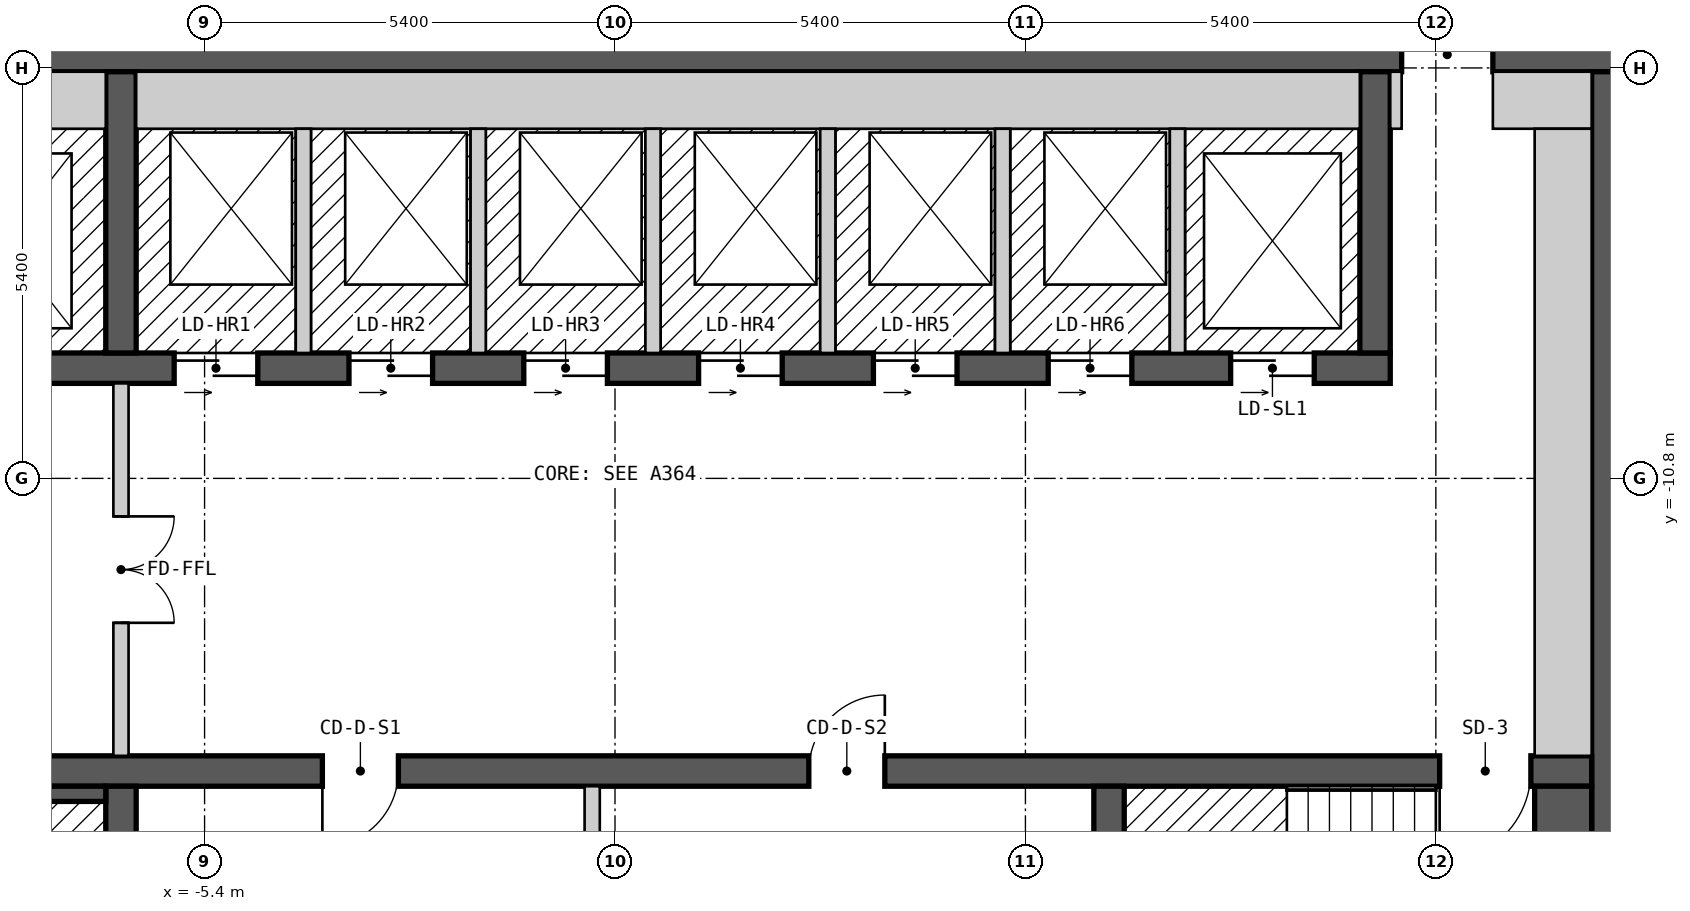
"""IFC4 building model, lengths in metres.
Left out: names, types, materials, properties, quantities, classifications, styles, units other than length and angle.
Written with IfcOpenShell. Run it as: python <this file> out.ifc"""

import sys

from ifc_helpers import new_model, si_unit, direction, frame, frame_2d, origin, place, context, subcontext, project, spatial, rectangle, extrude, element, fill, save


model = new_model("IFC4")
c1 = context("Model", 3, precision=1e-05, world=origin(), true_north=direction((0.0, 1.0)))
c2 = subcontext(c1, "Body", "Model", "MODEL_VIEW")
j1 = project(units=[si_unit("LENGTHUNIT", "METRE"), si_unit("PLANEANGLEUNIT", "RADIAN")], contexts=[c1])
p1 = place(None, origin())
s1 = spatial("IfcSite", under=j1, at=p1, CompositionType="ELEMENT")
p2 = place(p1, origin())
s2 = spatial("IfcBuilding", under=s1, at=p2, CompositionType="ELEMENT")
p3 = place(p2, frame((0.0, 0.0, 235.8)))
s3 = spatial("IfcBuildingStorey", under=s2, at=p3, CompositionType="ELEMENT", Elevation=235.8)
p4 = place(p3, frame((-13.3, -5.225, 0.0), z_axis=(0.0, 0.0, 1.0), x_axis=(1.0, 0.0, 0.0)))
e1 = element("IfcWall", 1, at=p4, inside=s3, PredefinedType="SHEAR", context=c2, shape_type="SweptSolid", body=[
    extrude(rectangle(XDim=26.6, YDim=0.45, at=frame_2d((13.3, 0.0))), origin(), (0.0, 0.0, 1.0), 2.7),
])
p5 = place(p4, frame((23.65, 0.0, 0.0)))
e2 = element("IfcOpeningElement", 2, at=p5, cuts=e1, PredefinedType="OPENING", context=c2, shape_type="SweptSolid", body=[
    extrude(rectangle(XDim=1.2, YDim=2.1, at=frame_2d((0.6, 1.05))), frame((0.0, 0.235, 0.0), z_axis=(0.0, -1.0, 0.0), x_axis=(1.0, 0.0, 0.0)), (0.0, 0.0, 1.0), 0.47),
])
p6 = place(p3, frame((13.075, -18.55, 0.0), z_axis=(0.0, 0.0, 1.0), x_axis=(0.0, 1.0, 0.0)))
e3 = element("IfcWall", 3, at=p6, inside=s3, PredefinedType="SHEAR", context=c2, shape_type="SweptSolid", body=[
    extrude(rectangle(XDim=13.1, YDim=0.45, at=frame_2d((6.55, 0.0))), origin(), (0.0, 0.0, 1.0), 2.7),
])
p7 = place(p3, frame((-12.85, -14.65, 0.0), z_axis=(0.0, 0.0, 1.0), x_axis=(1.0, 0.0, 0.0)))
e4 = element("IfcWall", 4, at=p7, inside=s3, PredefinedType="SHEAR", context=c2, shape_type="SweptSolid", body=[
    extrude(rectangle(XDim=25.7, YDim=0.4, at=frame_2d((12.85, 0.0))), origin(), (0.0, 0.0, 1.0), 2.7),
])
p8 = place(p7, frame((2.05, 0.0, 0.0), z_axis=(0.0, 0.0, 1.0), x_axis=(-1.0, 0.0, 0.0)))
e5 = element("IfcOpeningElement", 5, at=p8, cuts=e4, PredefinedType="OPENING", context=c2, shape_type="SweptSolid", body=[
    extrude(rectangle(XDim=1.2, YDim=2.1, at=frame_2d((0.6, 1.05))), frame((0.0, 0.21, 0.0), z_axis=(0.0, -1.0, 0.0), x_axis=(1.0, 0.0, 0.0)), (0.0, 0.0, 1.0), 0.42),
])
p9 = place(p7, frame((24.9, 0.0, 0.0), z_axis=(0.0, 0.0, 1.0), x_axis=(-1.0, 0.0, 0.0)))
e6 = element("IfcOpeningElement", 6, at=p9, cuts=e4, PredefinedType="OPENING", context=c2, shape_type="SweptSolid", body=[
    extrude(rectangle(XDim=1.2, YDim=2.1, at=frame_2d((0.6, 1.05))), frame((0.0, 0.21, 0.0), z_axis=(0.0, -1.0, 0.0), x_axis=(1.0, 0.0, 0.0)), (0.0, 0.0, 1.0), 0.42),
])
p10 = place(p7, frame((10.0, 0.0, 0.0), z_axis=(0.0, 0.0, 1.0), x_axis=(-1.0, 0.0, 0.0)))
e7 = element("IfcOpeningElement", 7, at=p10, cuts=e4, PredefinedType="OPENING", context=c2, shape_type="SweptSolid", body=[
    extrude(rectangle(XDim=1.0, YDim=2.1, at=frame_2d((0.5, 1.05))), frame((0.0, 0.21, 0.0), z_axis=(0.0, -1.0, 0.0), x_axis=(1.0, 0.0, 0.0)), (0.0, 0.0, 1.0), 0.42),
])
p11 = place(p7, frame((16.4, 0.0, 0.0), z_axis=(0.0, 0.0, 1.0), x_axis=(-1.0, 0.0, 0.0)))
e8 = element("IfcOpeningElement", 8, at=p11, cuts=e4, PredefinedType="OPENING", context=c2, shape_type="SweptSolid", body=[
    extrude(rectangle(XDim=1.0, YDim=2.1, at=frame_2d((0.5, 1.05))), frame((0.0, 0.21, 0.0), z_axis=(0.0, -1.0, 0.0), x_axis=(1.0, 0.0, 0.0)), (0.0, 0.0, 1.0), 0.42),
])
p12 = place(p3, frame((-12.85, -9.35, 0.0), z_axis=(0.0, 0.0, 1.0), x_axis=(1.0, 0.0, 0.0)))
e9 = element("IfcWall", 9, at=p12, inside=s3, PredefinedType="SHEAR", context=c2, shape_type="SweptSolid", body=[
    extrude(rectangle(XDim=23.05, YDim=0.4, at=frame_2d((11.525, 0.0))), origin(), (0.0, 0.0, 1.0), 2.7),
])
p13 = place(p12, frame((1.45, 0.0, 0.0)))
e10 = element("IfcOpeningElement", 10, at=p13, cuts=e9, PredefinedType="OPENING", context=c2, shape_type="SweptSolid", body=[
    extrude(rectangle(XDim=1.1, YDim=2.1, at=frame_2d((0.55, 1.05))), frame((0.0, 0.21, 0.0), z_axis=(0.0, -1.0, 0.0), x_axis=(1.0, 0.0, 0.0)), (0.0, 0.0, 1.0), 0.42),
])
p14 = place(p12, frame((4.25, 0.0, 0.0)))
e11 = element("IfcOpeningElement", 11, at=p14, cuts=e9, PredefinedType="OPENING", context=c2, shape_type="SweptSolid", body=[
    extrude(rectangle(XDim=1.1, YDim=2.1, at=frame_2d((0.55, 1.05))), frame((0.0, 0.21, 0.0), z_axis=(0.0, -1.0, 0.0), x_axis=(1.0, 0.0, 0.0)), (0.0, 0.0, 1.0), 0.42),
])
p15 = place(p12, frame((7.05, 0.0, 0.0)))
e12 = element("IfcOpeningElement", 12, at=p15, cuts=e9, PredefinedType="OPENING", context=c2, shape_type="SweptSolid", body=[
    extrude(rectangle(XDim=1.1, YDim=2.1, at=frame_2d((0.55, 1.05))), frame((0.0, 0.21, 0.0), z_axis=(0.0, -1.0, 0.0), x_axis=(1.0, 0.0, 0.0)), (0.0, 0.0, 1.0), 0.42),
])
p16 = place(p12, frame((9.35, 0.0, 0.0)))
e13 = element("IfcOpeningElement", 13, at=p16, cuts=e9, PredefinedType="OPENING", context=c2, shape_type="SweptSolid", body=[
    extrude(rectangle(XDim=1.1, YDim=2.1, at=frame_2d((0.55, 1.05))), frame((0.0, 0.21, 0.0), z_axis=(0.0, -1.0, 0.0), x_axis=(1.0, 0.0, 0.0)), (0.0, 0.0, 1.0), 0.42),
])
p17 = place(p12, frame((11.65, 0.0, 0.0)))
e14 = element("IfcOpeningElement", 14, at=p17, cuts=e9, PredefinedType="OPENING", context=c2, shape_type="SweptSolid", body=[
    extrude(rectangle(XDim=1.1, YDim=2.1, at=frame_2d((0.55, 1.05))), frame((0.0, 0.21, 0.0), z_axis=(0.0, -1.0, 0.0), x_axis=(1.0, 0.0, 0.0)), (0.0, 0.0, 1.0), 0.42),
])
p18 = place(p12, frame((13.95, 0.0, 0.0)))
e15 = element("IfcOpeningElement", 15, at=p18, cuts=e9, PredefinedType="OPENING", context=c2, shape_type="SweptSolid", body=[
    extrude(rectangle(XDim=1.1, YDim=2.1, at=frame_2d((0.55, 1.05))), frame((0.0, 0.21, 0.0), z_axis=(0.0, -1.0, 0.0), x_axis=(1.0, 0.0, 0.0)), (0.0, 0.0, 1.0), 0.42),
])
p19 = place(p12, frame((16.25, 0.0, 0.0)))
e16 = element("IfcOpeningElement", 16, at=p19, cuts=e9, PredefinedType="OPENING", context=c2, shape_type="SweptSolid", body=[
    extrude(rectangle(XDim=1.1, YDim=2.1, at=frame_2d((0.55, 1.05))), frame((0.0, 0.21, 0.0), z_axis=(0.0, -1.0, 0.0), x_axis=(1.0, 0.0, 0.0)), (0.0, 0.0, 1.0), 0.42),
])
p20 = place(p12, frame((18.55, 0.0, 0.0)))
e17 = element("IfcOpeningElement", 17, at=p20, cuts=e9, PredefinedType="OPENING", context=c2, shape_type="SweptSolid", body=[
    extrude(rectangle(XDim=1.1, YDim=2.1, at=frame_2d((0.55, 1.05))), frame((0.0, 0.21, 0.0), z_axis=(0.0, -1.0, 0.0), x_axis=(1.0, 0.0, 0.0)), (0.0, 0.0, 1.0), 0.42),
])
p21 = place(p12, frame((20.95, 0.0, 0.0)))
e18 = element("IfcOpeningElement", 18, at=p21, cuts=e9, PredefinedType="OPENING", context=c2, shape_type="SweptSolid", body=[
    extrude(rectangle(XDim=1.1, YDim=2.1, at=frame_2d((0.55, 1.05))), frame((0.0, 0.21, 0.0), z_axis=(0.0, -1.0, 0.0), x_axis=(1.0, 0.0, 0.0)), (0.0, 0.0, 1.0), 0.42),
])
for number, where, z_axis, x_axis in (
    (19, (-6.5, -18.55, 0.0), (0.0, 0.0, 1.0), (0.0, 1.0, 0.0)),
    (20, (6.5, -18.55, 0.0), (0.0, 0.0, 1.0), (0.0, 1.0, 0.0)),
    (21, (-6.5, -9.15, 0.0), (0.0, 0.0, 1.0), (0.0, 1.0, 0.0)),
    (22, (10.0, -9.15, 0.0), (0.0, 0.0, 1.0), (0.0, 1.0, 0.0)),
):
    element("IfcWall", number, at=place(p3, frame(where, z_axis=z_axis, x_axis=x_axis)), inside=s3, PredefinedType="SHEAR", context=c2, shape_type="SweptSolid", body=[
        extrude(rectangle(XDim=3.7, YDim=0.4, at=frame_2d((1.85, 0.0))), origin(), (0.0, 0.0, 1.0), 2.7),
    ])
p22 = place(p3, frame((-12.1, -5.825, 0.0), z_axis=(0.0, 0.0, 1.0), x_axis=(1.0, 0.0, 0.0)))
e23 = element("IfcWall", 23, at=p22, inside=s3, PredefinedType="SOLIDWALL", context=c2, shape_type="SweptSolid", body=[
    extrude(rectangle(XDim=5.4, YDim=0.75, at=frame_2d((2.7, 0.0))), origin(), (0.0, 0.0, 1.0), 2.7),
])
p23 = place(p3, frame((-10.8, -14.95, 0.0), z_axis=(0.0, 0.0, 1.0), x_axis=(1.0, 0.0, 0.0)))
e24 = element("IfcWall", 24, at=p23, inside=s3, PredefinedType="SOLIDWALL", context=c2, shape_type="SweptSolid", body=[
    extrude(rectangle(XDim=4.1, YDim=0.2, at=frame_2d((2.05, 0.0))), origin(), (0.0, 0.0, 1.0), 2.7),
])
p24 = place(p3, frame((-6.5, -14.45, 0.0), z_axis=(0.0, 0.0, 1.0), x_axis=(0.0, 1.0, 0.0)))
e25 = element("IfcWall", 25, at=p24, inside=s3, PredefinedType="PARTITIONING", context=c2, shape_type="SweptSolid", body=[
    extrude(rectangle(XDim=4.9, YDim=0.2, at=frame_2d((2.45, 0.0))), origin(), (0.0, 0.0, 1.0), 2.7),
])
p25 = place(p24, frame((3.15, 0.0, 0.0), z_axis=(0.0, 0.0, 1.0), x_axis=(-1.0, 0.0, 0.0)))
e26 = element("IfcOpeningElement", 26, at=p25, cuts=e25, PredefinedType="OPENING", context=c2, shape_type="SweptSolid", body=[
    extrude(rectangle(XDim=1.4, YDim=2.1, at=frame_2d((0.7, 1.05))), frame((0.0, 0.11, 0.0), z_axis=(0.0, -1.0, 0.0), x_axis=(1.0, 0.0, 0.0)), (0.0, 0.0, 1.0), 0.22),
])
p26 = place(p3, frame((-6.3, -5.825, 0.0), z_axis=(0.0, 0.0, 1.0), x_axis=(1.0, 0.0, 0.0)))
e27 = element("IfcWall", 27, at=p26, inside=s3, PredefinedType="SOLIDWALL", context=c2, shape_type="SweptSolid", body=[
    extrude(rectangle(XDim=16.1, YDim=0.75, at=frame_2d((8.05, 0.0))), origin(), (0.0, 0.0, 1.0), 2.7),
])
for number, where, z_axis, x_axis in (
    (28, (-4.1, -9.15, 0.0), (0.0, 0.0, 1.0), (0.0, 1.0, 0.0)),
    (29, (-1.8, -9.15, 0.0), (0.0, 0.0, 1.0), (0.0, 1.0, 0.0)),
):
    element("IfcWall", number, at=place(p3, frame(where, z_axis=z_axis, x_axis=x_axis)), inside=s3, PredefinedType="SOLIDWALL", context=c2, shape_type="SweptSolid", body=[
        extrude(rectangle(XDim=2.95, YDim=0.2, at=frame_2d((1.475, 0.0))), origin(), (0.0, 0.0, 1.0), 2.7),
    ])
p27 = place(p3, frame((-0.3, -17.8, 0.0), z_axis=(0.0, 0.0, 1.0), x_axis=(0.0, 1.0, 0.0)))
e30 = element("IfcWall", 30, at=p27, inside=s3, PredefinedType="PARTITIONING", context=c2, shape_type="SweptSolid", body=[
    extrude(rectangle(XDim=2.95, YDim=0.2, at=frame_2d((1.475, 0.0))), origin(), (0.0, 0.0, 1.0), 2.7),
])
for number, where, z_axis, x_axis in (
    (31, (0.5, -9.15, 0.0), (0.0, 0.0, 1.0), (0.0, 1.0, 0.0)),
    (32, (2.8, -9.15, 0.0), (0.0, 0.0, 1.0), (0.0, 1.0, 0.0)),
    (33, (5.1, -9.15, 0.0), (0.0, 0.0, 1.0), (0.0, 1.0, 0.0)),
    (34, (7.4, -9.15, 0.0), (0.0, 0.0, 1.0), (0.0, 1.0, 0.0)),
):
    element("IfcWall", number, at=place(p3, frame(where, z_axis=z_axis, x_axis=x_axis)), inside=s3, PredefinedType="SOLIDWALL", context=c2, shape_type="SweptSolid", body=[
        extrude(rectangle(XDim=2.95, YDim=0.2, at=frame_2d((1.475, 0.0))), origin(), (0.0, 0.0, 1.0), 2.7),
    ])
p28 = place(p3, frame((10.275, -6.2, 0.0), z_axis=(0.0, 0.0, 1.0), x_axis=(0.0, 1.0, 0.0)))
e35 = element("IfcWall", 35, at=p28, inside=s3, PredefinedType="PARTITIONING", context=c2, shape_type="SweptSolid", body=[
    extrude(rectangle(XDim=0.75, YDim=0.15, at=frame_2d((0.375, 0.0))), origin(), (0.0, 0.0, 1.0), 2.7),
])
p29 = place(p3, frame((11.55, -5.825, 0.0), z_axis=(0.0, 0.0, 1.0), x_axis=(1.0, 0.0, 0.0)))
e36 = element("IfcWall", 36, at=p29, inside=s3, PredefinedType="PARTITIONING", context=c2, shape_type="SweptSolid", body=[
    extrude(rectangle(XDim=1.3, YDim=0.75, at=frame_2d((0.65, 0.0))), origin(), (0.0, 0.0, 1.0), 2.7),
])
p30 = place(p3, frame((12.475, -17.6, 0.0), z_axis=(0.0, 0.0, 1.0), x_axis=(0.0, 1.0, 0.0)))
e37 = element("IfcWall", 37, at=p30, inside=s3, PredefinedType="SOLIDWALL", context=c2, shape_type="SweptSolid", body=[
    extrude(rectangle(XDim=2.75, YDim=0.75, at=frame_2d((1.375, 0.0))), origin(), (0.0, 0.0, 1.0), 2.7),
])
p31 = place(p3, frame((12.475, -14.45, 0.0), z_axis=(0.0, 0.0, 1.0), x_axis=(0.0, 1.0, 0.0)))
e38 = element("IfcWall", 38, at=p31, inside=s3, PredefinedType="PARTITIONING", context=c2, shape_type="SweptSolid", body=[
    extrude(rectangle(XDim=8.25, YDim=0.75, at=frame_2d((4.125, 0.0))), origin(), (0.0, 0.0, 1.0), 2.7),
])
p32 = place(p15, origin())
e39 = element("IfcDoor", 39, at=p32, inside=s3, OperationType="DOUBLE_DOOR_SLIDING", PredefinedType="DOOR", context=c2, shape_type="SweptSolid", body=[
    extrude(rectangle(XDim=1.1, YDim=2.1, at=frame_2d((0.55, 1.05))), frame((0.0, 0.025, 0.0), z_axis=(0.0, -1.0, 0.0), x_axis=(1.0, 0.0, 0.0)), (0.0, 0.0, 1.0), 0.05),
])
fill(e12, e39)
p33 = place(p16, origin())
e40 = element("IfcDoor", 40, at=p33, inside=s3, OperationType="DOUBLE_DOOR_SLIDING", PredefinedType="DOOR", context=c2, shape_type="SweptSolid", body=[
    extrude(rectangle(XDim=1.1, YDim=2.1, at=frame_2d((0.55, 1.05))), frame((0.0, 0.025, 0.0), z_axis=(0.0, -1.0, 0.0), x_axis=(1.0, 0.0, 0.0)), (0.0, 0.0, 1.0), 0.05),
])
fill(e13, e40)
p34 = place(p17, origin())
e41 = element("IfcDoor", 41, at=p34, inside=s3, OperationType="DOUBLE_DOOR_SLIDING", PredefinedType="DOOR", context=c2, shape_type="SweptSolid", body=[
    extrude(rectangle(XDim=1.1, YDim=2.1, at=frame_2d((0.55, 1.05))), frame((0.0, 0.025, 0.0), z_axis=(0.0, -1.0, 0.0), x_axis=(1.0, 0.0, 0.0)), (0.0, 0.0, 1.0), 0.05),
])
fill(e14, e41)
p35 = place(p18, origin())
e42 = element("IfcDoor", 42, at=p35, inside=s3, OperationType="DOUBLE_DOOR_SLIDING", PredefinedType="DOOR", context=c2, shape_type="SweptSolid", body=[
    extrude(rectangle(XDim=1.1, YDim=2.1, at=frame_2d((0.55, 1.05))), frame((0.0, 0.025, 0.0), z_axis=(0.0, -1.0, 0.0), x_axis=(1.0, 0.0, 0.0)), (0.0, 0.0, 1.0), 0.05),
])
fill(e15, e42)
p36 = place(p19, origin())
e43 = element("IfcDoor", 43, at=p36, inside=s3, OperationType="DOUBLE_DOOR_SLIDING", PredefinedType="DOOR", context=c2, shape_type="SweptSolid", body=[
    extrude(rectangle(XDim=1.1, YDim=2.1, at=frame_2d((0.55, 1.05))), frame((0.0, 0.025, 0.0), z_axis=(0.0, -1.0, 0.0), x_axis=(1.0, 0.0, 0.0)), (0.0, 0.0, 1.0), 0.05),
])
fill(e16, e43)
p37 = place(p20, origin())
e44 = element("IfcDoor", 44, at=p37, inside=s3, OperationType="DOUBLE_DOOR_SLIDING", PredefinedType="DOOR", context=c2, shape_type="SweptSolid", body=[
    extrude(rectangle(XDim=1.1, YDim=2.1, at=frame_2d((0.55, 1.05))), frame((0.0, 0.025, 0.0), z_axis=(0.0, -1.0, 0.0), x_axis=(1.0, 0.0, 0.0)), (0.0, 0.0, 1.0), 0.05),
])
fill(e17, e44)
p38 = place(p21, origin())
e45 = element("IfcDoor", 45, at=p38, inside=s3, OperationType="DOUBLE_DOOR_SLIDING", PredefinedType="DOOR", context=c2, shape_type="SweptSolid", body=[
    extrude(rectangle(XDim=1.1, YDim=2.1, at=frame_2d((0.55, 1.05))), frame((0.0, 0.025, 0.0), z_axis=(0.0, -1.0, 0.0), x_axis=(1.0, 0.0, 0.0)), (0.0, 0.0, 1.0), 0.05),
])
fill(e18, e45)
p39 = place(p9, origin())
e46 = element("IfcDoor", 46, at=p39, inside=s3, OperationType="SINGLE_SWING_RIGHT", PredefinedType="DOOR", context=c2, shape_type="SweptSolid", body=[
    extrude(rectangle(XDim=1.2, YDim=2.1, at=frame_2d((0.6, 1.05))), frame((0.0, 0.025, 0.0), z_axis=(0.0, -1.0, 0.0), x_axis=(1.0, 0.0, 0.0)), (0.0, 0.0, 1.0), 0.05),
])
fill(e6, e46)
p40 = place(p25, origin())
e47 = element("IfcDoor", 47, at=p40, inside=s3, OperationType="DOUBLE_DOOR_SINGLE_SWING", PredefinedType="DOOR", context=c2, shape_type="SweptSolid", body=[
    extrude(rectangle(XDim=1.4, YDim=2.1, at=frame_2d((0.7, 1.05))), frame((0.0, 0.025, 0.0), z_axis=(0.0, -1.0, 0.0), x_axis=(1.0, 0.0, 0.0)), (0.0, 0.0, 1.0), 0.05),
])
fill(e26, e47)
p41 = place(p5, origin())
e48 = element("IfcDoor", 48, at=p41, inside=s3, OperationType="DOUBLE_DOOR_SINGLE_SWING", PredefinedType="DOOR", context=c2, shape_type="SweptSolid", body=[
    extrude(rectangle(XDim=1.2, YDim=2.1, at=frame_2d((0.6, 1.05))), frame((0.0, 0.025, 0.0), z_axis=(0.0, -1.0, 0.0), x_axis=(1.0, 0.0, 0.0)), (0.0, 0.0, 1.0), 0.05),
])
fill(e2, e48)
p42 = place(p10, origin())
e49 = element("IfcDoor", 49, at=p42, inside=s3, OperationType="SINGLE_SWING_RIGHT", PredefinedType="DOOR", context=c2, shape_type="SweptSolid", body=[
    extrude(rectangle(XDim=1.0, YDim=2.1, at=frame_2d((0.5, 1.05))), frame((0.0, 0.025, 0.0), z_axis=(0.0, -1.0, 0.0), x_axis=(1.0, 0.0, 0.0)), (0.0, 0.0, 1.0), 0.05),
])
fill(e7, e49)
p43 = place(p11, origin())
e50 = element("IfcDoor", 50, at=p43, inside=s3, OperationType="SINGLE_SWING_LEFT", PredefinedType="DOOR", context=c2, shape_type="SweptSolid", body=[
    extrude(rectangle(XDim=1.0, YDim=2.1, at=frame_2d((0.5, 1.05))), frame((0.0, 0.025, 0.0), z_axis=(0.0, -1.0, 0.0), x_axis=(1.0, 0.0, 0.0)), (0.0, 0.0, 1.0), 0.05),
])
fill(e8, e50)
save(model, sys.argv[1])
